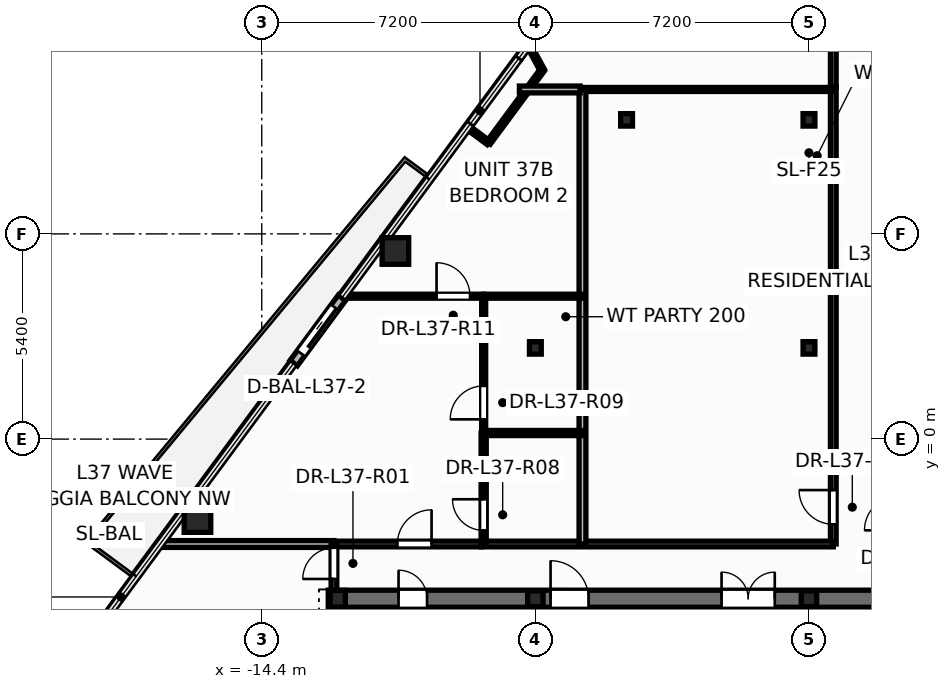
"""IFC4 building model, lengths in metres.
Left out: names, types, materials, properties, quantities, classifications, styles, units other than length and angle.
Written with IfcOpenShell. Run it as: python <this file> out.ifc"""

import sys

from ifc_helpers import new_model, si_unit, direction, frame, frame_2d, origin, origin_2d, place, context, subcontext, project, spatial, rectangle, hollow_circle, i_section, extrude, element, fill, save


model = new_model("IFC4")
c1 = context("Model", 3, precision=1e-05, world=origin(), true_north=direction((0.0, 1.0)))
c2 = subcontext(c1, "Body", "Model", "MODEL_VIEW")
j1 = project(units=[si_unit("LENGTHUNIT", "METRE"), si_unit("PLANEANGLEUNIT", "RADIAN")], contexts=[c1])
p1 = place(None, origin())
s1 = spatial("IfcSite", under=j1, at=p1, CompositionType="ELEMENT")
p2 = place(p1, origin())
s2 = spatial("IfcBuilding", under=s1, at=p2, CompositionType="ELEMENT")
p3 = place(p2, frame((0.0, 0.0, 143.7)))
s3 = spatial("IfcBuildingStorey", under=s2, at=p3, CompositionType="ELEMENT", Elevation=143.7)
for number, where, z_axis, x_axis in (
    (1, (-10.883, 4.95, 0.0), (0.0, 0.0, 1.0), (1.0, 0.0, 0.0)),
    (2, (-16.092, -2.103, 0.0), (0.0, 0.0, 1.0), (1.0, 0.0, 0.0)),
):
    element("IfcColumn", number, at=place(p3, frame(where, z_axis=z_axis, x_axis=x_axis)), inside=s3, PredefinedType="COLUMN", context=c2, shape_type="SweptSolid", body=[
        extrude(hollow_circle(Radius=0.35, WallThickness=0.03, at=origin_2d()), origin(), (0.0, 0.0, 1.0), 3.6),
    ])
p4 = place(p3, frame((-12.4, -4.2, 0.0), z_axis=(0.0, 0.0, 1.0), x_axis=(1.0, 0.0, 0.0)))
e3 = element("IfcColumn", 3, at=p4, inside=s3, PredefinedType="COLUMN", context=c2, shape_type="SweptSolid", body=[
    extrude(i_section(OverallWidth=0.4, OverallDepth=0.44, WebThickness=0.028, FlangeThickness=0.04, at=origin_2d()), origin(), (0.0, 0.0, 1.0), 3.6),
])
for number, where, z_axis, x_axis in (
    (4, (-7.2, -4.2, 0.0), (0.0, 0.0, 1.0), (1.0, 0.0, 0.0)),
    (5, (0.0, -4.2, 0.0), (0.0, 0.0, 1.0), (1.0, 0.0, 0.0)),
):
    element("IfcColumn", number, at=place(p3, frame(where, z_axis=z_axis, x_axis=x_axis)), inside=s3, PredefinedType="PILASTER", context=c2, shape_type="SweptSolid", body=[
        extrude(i_section(OverallWidth=0.405, OverallDepth=0.414, WebThickness=0.022, FlangeThickness=0.032, at=origin_2d()), origin(), (0.0, 0.0, 1.0), 3.6),
    ])
for number, where, z_axis, x_axis in (
    (6, (-7.2, 2.4, 0.0), (0.0, 0.0, 1.0), (1.0, 0.0, 0.0)),
    (7, (0.0, 2.4, 0.0), (0.0, 0.0, 1.0), (1.0, 0.0, 0.0)),
    (8, (-4.8, 8.4, 0.0), (0.0, 0.0, 1.0), (1.0, 0.0, 0.0)),
    (9, (0.0, 8.4, 0.0), (0.0, 0.0, 1.0), (1.0, 0.0, 0.0)),
):
    element("IfcColumn", number, at=place(p3, frame(where, z_axis=z_axis, x_axis=x_axis)), inside=s3, PredefinedType="COLUMN", context=c2, shape_type="SweptSolid", body=[
        extrude(i_section(OverallWidth=0.311, OverallDepth=0.327, WebThickness=0.016, FlangeThickness=0.025, at=origin_2d()), origin(), (0.0, 0.0, 1.0), 3.6),
    ])
p5 = place(p3, frame((-12.288, 3.721, -0.015), z_axis=(0.0, 0.0, 1.0), x_axis=(-0.593996463284, -0.804467651062, 0.0)))
e10 = element("IfcWall", 10, at=p5, inside=s3, PredefinedType="STANDARD", context=c2, shape_type="SweptSolid", body=[
    extrude(rectangle(XDim=2.14, YDim=0.24, at=frame_2d((1.07, 0.0))), origin(), (0.0, 0.0, 1.0), 2.807),
])
p6 = place(p5, frame((0.32, 0.0, 0.015)))
e11 = element("IfcOpeningElement", 11, at=p6, cuts=e10, PredefinedType="OPENING", context=c2, shape_type="SweptSolid", body=[
    extrude(rectangle(XDim=1.506, YDim=2.204, at=frame_2d((0.75, 1.102))), frame((0.0, 0.13, 0.0), z_axis=(0.0, -1.0, 0.0), x_axis=(1.0, 0.0, 0.0)), (0.0, 0.0, 1.0), 0.26),
])
p7 = place(p3, frame((-2.88, -5.6, 0.0), z_axis=(0.0, 0.0, 1.0), x_axis=(0.0, 1.0, 0.0)))
e12 = element("IfcWall", 12, at=p7, inside=s3, PredefinedType="PARTITIONING", context=c2, shape_type="SweptSolid", body=[
    extrude(rectangle(XDim=1.15, YDim=0.15, at=frame_2d((0.575, 0.0))), origin(), (0.0, 0.0, 1.0), 3.35),
])
p8 = place(p3, frame((-12.65, -4.2, 0.0), z_axis=(0.0, 0.0, 1.0), x_axis=(1.0, 0.0, 0.0)))
e13 = element("IfcWall", 13, at=p8, inside=s3, PredefinedType="SHEAR", context=c2, shape_type="SweptSolid", body=[
    extrude(rectangle(XDim=25.3, YDim=0.45, at=frame_2d((12.65, 0.0))), origin(), (0.0, 0.0, 1.0), 3.6),
])
p9 = place(p8, frame((1.85, 0.0, 0.0)))
e14 = element("IfcOpeningElement", 14, at=p9, cuts=e13, PredefinedType="OPENING", context=c2, shape_type="SweptSolid", body=[
    extrude(rectangle(XDim=0.756, YDim=2.054, at=frame_2d((0.375, 1.027))), frame((0.0, 0.235, 0.0), z_axis=(0.0, -1.0, 0.0), x_axis=(1.0, 0.0, 0.0)), (0.0, 0.0, 1.0), 0.47),
])
p10 = place(p8, frame((21.85, 0.0, 0.0)))
e15 = element("IfcOpeningElement", 15, at=p10, cuts=e13, PredefinedType="OPENING", context=c2, shape_type="SweptSolid", body=[
    extrude(rectangle(XDim=0.756, YDim=2.054, at=frame_2d((0.375, 1.027))), frame((0.0, 0.235, 0.0), z_axis=(0.0, -1.0, 0.0), x_axis=(1.0, 0.0, 0.0)), (0.0, 0.0, 1.0), 0.47),
])
p11 = place(p8, frame((23.5, 0.0, 0.0)))
e16 = element("IfcOpeningElement", 16, at=p11, cuts=e13, PredefinedType="OPENING", context=c2, shape_type="SweptSolid", body=[
    extrude(rectangle(XDim=0.756, YDim=2.054, at=frame_2d((0.375, 1.027))), frame((0.0, 0.235, 0.0), z_axis=(0.0, -1.0, 0.0), x_axis=(1.0, 0.0, 0.0)), (0.0, 0.0, 1.0), 0.47),
])
p12 = place(p8, frame((5.85, 0.0, 0.0)))
e17 = element("IfcOpeningElement", 17, at=p12, cuts=e13, PredefinedType="OPENING", context=c2, shape_type="SweptSolid", body=[
    extrude(rectangle(XDim=1.006, YDim=2.104, at=frame_2d((0.5, 1.052))), frame((0.0, 0.235, 0.0), z_axis=(0.0, -1.0, 0.0), x_axis=(1.0, 0.0, 0.0)), (0.0, 0.0, 1.0), 0.47),
])
p13 = place(p8, frame((10.35, 0.0, 0.0)))
e18 = element("IfcOpeningElement", 18, at=p13, cuts=e13, PredefinedType="OPENING", context=c2, shape_type="SweptSolid", body=[
    extrude(rectangle(XDim=1.406, YDim=2.154, at=frame_2d((0.7, 1.077))), frame((0.0, 0.235, 0.0), z_axis=(0.0, -1.0, 0.0), x_axis=(1.0, 0.0, 0.0)), (0.0, 0.0, 1.0), 0.47),
])
p14 = place(p8, frame((18.45, 0.0, 0.0)))
e19 = element("IfcOpeningElement", 19, at=p14, cuts=e13, PredefinedType="OPENING", context=c2, shape_type="SweptSolid", body=[
    extrude(rectangle(XDim=1.006, YDim=2.104, at=frame_2d((0.5, 1.052))), frame((0.0, 0.235, 0.0), z_axis=(0.0, -1.0, 0.0), x_axis=(1.0, 0.0, 0.0)), (0.0, 0.0, 1.0), 0.47),
])
p15 = place(p3, frame((-8.48, -13.85, 0.0), z_axis=(0.0, 0.0, 1.0), x_axis=(0.0, 1.0, 0.0)))
e20 = element("IfcWall", 20, at=p15, inside=s3, PredefinedType="SHEAR", context=c2, shape_type="SweptSolid", body=[
    extrude(rectangle(XDim=9.4, YDim=0.25, at=frame_2d((4.7, 0.0))), origin(), (0.0, 0.0, 1.0), 3.6),
])
p16 = place(p15, frame((6.95, 0.0, 0.0)))
e21 = element("IfcOpeningElement", 21, at=p16, cuts=e20, PredefinedType="OPENING", context=c2, shape_type="SweptSolid", body=[
    extrude(rectangle(XDim=1.006, YDim=2.104, at=frame_2d((0.5, 1.052))), frame((0.0, 0.135, 0.0), z_axis=(0.0, -1.0, 0.0), x_axis=(1.0, 0.0, 0.0)), (0.0, 0.0, 1.0), 0.27),
])
p17 = place(p3, frame((-5.12, -13.85, 0.0), z_axis=(0.0, 0.0, 1.0), x_axis=(0.0, 1.0, 0.0)))
e22 = element("IfcWall", 22, at=p17, inside=s3, PredefinedType="SHEAR", context=c2, shape_type="SweptSolid", body=[
    extrude(rectangle(XDim=9.4, YDim=0.25, at=frame_2d((4.7, 0.0))), origin(), (0.0, 0.0, 1.0), 3.6),
])
p18 = place(p3, frame((-12.4, -13.85, 0.0), z_axis=(0.0, 0.0, 1.0), x_axis=(0.0, 1.0, 0.0)))
e23 = element("IfcWall", 23, at=p18, inside=s3, PredefinedType="SHEAR", context=c2, shape_type="SweptSolid", body=[
    extrude(rectangle(XDim=9.4, YDim=0.45, at=frame_2d((4.7, 0.0))), origin(), (0.0, 0.0, 1.0), 3.6),
])
p19 = place(p3, frame((0.64, -2.76, 0.0), z_axis=(0.0, 0.0, 1.0), x_axis=(0.0, 1.0, 0.0)))
e24 = element("IfcWall", 24, at=p19, inside=s3, PredefinedType="PARTITIONING", context=c2, shape_type="SweptSolid", body=[
    extrude(rectangle(XDim=12.02, YDim=0.15, at=frame_2d((6.01, 0.0))), origin(), (0.0, 0.0, 1.0), 2.325),
])
p20 = place(p19, frame((0.519, 0.0, 0.0)))
e25 = element("IfcOpeningElement", 25, at=p20, cuts=e24, PredefinedType="OPENING", context=c2, shape_type="SweptSolid", body=[
    extrude(rectangle(XDim=0.906, YDim=2.104, at=frame_2d((0.45, 1.052))), frame((0.0, 0.085, 0.0), z_axis=(0.0, -1.0, 0.0), x_axis=(1.0, 0.0, 0.0)), (0.0, 0.0, 1.0), 0.17),
])
p21 = place(p3, frame((-8.62, -2.76, 0.0), z_axis=(0.0, 0.0, 1.0), x_axis=(1.0, 0.0, 0.0)))
e26 = element("IfcWall", 26, at=p21, inside=s3, PredefinedType="PARTITIONING", context=c2, shape_type="SweptSolid", body=[
    extrude(rectangle(XDim=9.26, YDim=0.15, at=frame_2d((4.63, 0.0))), origin(), (0.0, 0.0, 1.0), 2.325),
])
p22 = place(p3, frame((-6.02, 9.2, 0.0), z_axis=(0.0, 0.0, 1.0), x_axis=(1.0, 0.0, 0.0)))
e27 = element("IfcWall", 27, at=p22, inside=s3, PredefinedType="PARTITIONING", context=c2, shape_type="SweptSolid", body=[
    extrude(rectangle(XDim=6.66, YDim=0.105, at=frame_2d((3.33, 0.0))), origin(), (0.0, 0.0, 1.0), 2.617),
])
p23 = place(p3, frame((-5.96, -2.76, 0.0), z_axis=(0.0, 0.0, 1.0), x_axis=(0.0, 1.0, 0.0)))
e28 = element("IfcWall", 28, at=p23, inside=s3, PredefinedType="PARTITIONING", context=c2, shape_type="SweptSolid", body=[
    extrude(rectangle(XDim=11.96, YDim=0.18, at=frame_2d((5.98, 0.0))), origin(), (0.0, 0.0, 1.0), 2.325),
])
p24 = place(p3, frame((-17.074, -2.76, 0.0), z_axis=(0.0, 0.0, 1.0), x_axis=(1.0, 0.0, 0.0)))
e29 = element("IfcWall", 29, at=p24, inside=s3, PredefinedType="PARTITIONING", context=c2, shape_type="SweptSolid", body=[
    extrude(rectangle(XDim=4.574, YDim=0.18, at=frame_2d((2.287, 0.0))), origin(), (0.0, 0.0, 1.0), 2.792),
])
p25 = place(p3, frame((-12.5, -2.76, 0.0), z_axis=(0.0, 0.0, 1.0), x_axis=(1.0, 0.0, 0.0)))
e30 = element("IfcWall", 30, at=p25, inside=s3, PredefinedType="PARTITIONING", context=c2, shape_type="SweptSolid", body=[
    extrude(rectangle(XDim=3.878, YDim=0.15, at=frame_2d((1.939, 0.0))), origin(), (0.0, 0.0, 1.0), 3.35),
])
p26 = place(p25, frame((1.669, 0.0, 0.0)))
e31 = element("IfcOpeningElement", 31, at=p26, cuts=e30, PredefinedType="OPENING", context=c2, shape_type="SweptSolid", body=[
    extrude(rectangle(XDim=0.906, YDim=2.104, at=frame_2d((0.45, 1.052))), frame((0.0, 0.085, 0.0), z_axis=(0.0, -1.0, 0.0), x_axis=(1.0, 0.0, 0.0)), (0.0, 0.0, 1.0), 0.17),
])
p27 = place(p3, frame((-12.259, 3.76, 0.0), z_axis=(0.0, 0.0, 1.0), x_axis=(1.0, 0.0, 0.0)))
e32 = element("IfcWall", 32, at=p27, inside=s3, PredefinedType="PARTITIONING", context=c2, shape_type="SweptSolid", body=[
    extrude(rectangle(XDim=3.699, YDim=0.105, at=frame_2d((1.849, 0.0))), origin(), (0.0, 0.0, 1.0), 2.792),
])
p28 = place(p27, frame((2.459, 0.0, 0.0)))
e33 = element("IfcOpeningElement", 33, at=p28, cuts=e32, PredefinedType="OPENING", context=c2, shape_type="SweptSolid", body=[
    extrude(rectangle(XDim=0.886, YDim=2.104, at=frame_2d((0.44, 1.052))), frame((0.0, 0.062, 0.0), z_axis=(0.0, -1.0, 0.0), x_axis=(1.0, 0.0, 0.0)), (0.0, 0.0, 1.0), 0.125),
])
p29 = place(p3, frame((-8.56, 0.16, 0.0), z_axis=(0.0, 0.0, 1.0), x_axis=(0.0, 1.0, 0.0)))
e34 = element("IfcWall", 34, at=p29, inside=s3, PredefinedType="PARTITIONING", context=c2, shape_type="SweptSolid", body=[
    extrude(rectangle(XDim=3.6, YDim=0.105, at=frame_2d((1.8, 0.0))), origin(), (0.0, 0.0, 1.0), 2.617),
])
p30 = place(p29, frame((0.36, 0.0, 0.0)))
e35 = element("IfcOpeningElement", 35, at=p30, cuts=e34, PredefinedType="OPENING", context=c2, shape_type="SweptSolid", body=[
    extrude(rectangle(XDim=0.886, YDim=2.104, at=frame_2d((0.44, 1.052))), frame((0.0, 0.062, 0.0), z_axis=(0.0, -1.0, 0.0), x_axis=(1.0, 0.0, 0.0)), (0.0, 0.0, 1.0), 0.125),
])
p31 = place(p3, frame((-8.56, -2.76, 0.0), z_axis=(0.0, 0.0, 1.0), x_axis=(0.0, 1.0, 0.0)))
e36 = element("IfcWall", 36, at=p31, inside=s3, PredefinedType="PARTITIONING", context=c2, shape_type="SweptSolid", body=[
    extrude(rectangle(XDim=2.92, YDim=0.135, at=frame_2d((1.46, 0.0))), origin(), (0.0, 0.0, 1.0), 3.35),
])
p32 = place(p31, frame((0.357, 0.0, 0.0)))
e37 = element("IfcOpeningElement", 37, at=p32, cuts=e36, PredefinedType="OPENING", context=c2, shape_type="SweptSolid", body=[
    extrude(rectangle(XDim=0.826, YDim=2.104, at=frame_2d((0.41, 1.052))), frame((0.0, 0.078, 0.0), z_axis=(0.0, -1.0, 0.0), x_axis=(1.0, 0.0, 0.0)), (0.0, 0.0, 1.0), 0.155),
])
p33 = place(p3, frame((0.64, 9.262, 0.0), z_axis=(0.0, 0.0, 1.0), x_axis=(0.0, 1.0, 0.0)))
e38 = element("IfcWall", 38, at=p33, inside=s3, PredefinedType="PARTITIONING", context=c2, shape_type="SweptSolid", body=[
    extrude(rectangle(XDim=2.538, YDim=0.15, at=frame_2d((1.269, 0.0))), origin(), (0.0, 0.0, 1.0), 3.35),
])
p34 = place(p33, frame((1.05, 0.0, 0.0)))
e39 = element("IfcOpeningElement", 39, at=p34, cuts=e38, PredefinedType="OPENING", context=c2, shape_type="SweptSolid", body=[
    extrude(rectangle(XDim=0.906, YDim=2.104, at=frame_2d((0.45, 1.052))), frame((0.0, 0.085, 0.0), z_axis=(0.0, -1.0, 0.0), x_axis=(1.0, 0.0, 0.0)), (0.0, 0.0, 1.0), 0.17),
])
p35 = place(p3, frame((-8.56, 0.16, 0.0), z_axis=(0.0, 0.0, 1.0), x_axis=(1.0, 0.0, 0.0)))
e40 = element("IfcWall", 40, at=p35, inside=s3, PredefinedType="PARTITIONING", context=c2, shape_type="SweptSolid", body=[
    extrude(rectangle(XDim=2.6, YDim=0.135, at=frame_2d((1.3, 0.0))), origin(), (0.0, 0.0, 1.0), 2.325),
])
p36 = place(p3, frame((-8.56, 3.76, 0.0), z_axis=(0.0, 0.0, 1.0), x_axis=(1.0, 0.0, 0.0)))
e41 = element("IfcWall", 41, at=p36, inside=s3, PredefinedType="PARTITIONING", context=c2, shape_type="SweptSolid", body=[
    extrude(rectangle(XDim=2.6, YDim=0.105, at=frame_2d((1.3, 0.0))), origin(), (0.0, 0.0, 1.0), 2.617),
])
p37 = place(p3, frame((-7.019, 9.71, 0.0), z_axis=(0.0, 0.0, 1.0), x_axis=(-0.594168747529, -0.804340412674, 0.0)))
e42 = element("IfcWall", 42, at=p37, inside=s3, PredefinedType="PARTITIONING", context=c2, shape_type="SweptSolid", body=[
    extrude(rectangle(XDim=2.378, YDim=0.12, at=frame_2d((1.189, 0.0))), origin(), (0.0, 0.0, 1.0), 3.35),
])
p38 = place(p3, frame((-7.62, 9.2, 0.0), z_axis=(0.0, 0.0, 1.0), x_axis=(1.0, 0.0, 0.0)))
e43 = element("IfcWall", 43, at=p38, inside=s3, PredefinedType="PARTITIONING", context=c2, shape_type="SweptSolid", body=[
    extrude(rectangle(XDim=1.598, YDim=0.18, at=frame_2d((0.799, 0.0))), origin(), (0.0, 0.0, 1.0), 3.35),
])
p39 = place(p3, frame((-12.5, -4.24, 0.0), z_axis=(0.0, 0.0, 1.0), x_axis=(0.0, 1.0, 0.0)))
e44 = element("IfcWall", 44, at=p39, inside=s3, PredefinedType="PARTITIONING", context=c2, shape_type="SweptSolid", body=[
    extrude(rectangle(XDim=1.48, YDim=0.15, at=frame_2d((0.74, 0.0))), origin(), (0.0, 0.0, 1.0), 2.325),
])
p40 = place(p39, frame((0.56, 0.0, 0.0)))
e45 = element("IfcOpeningElement", 45, at=p40, cuts=e44, PredefinedType="OPENING", context=c2, shape_type="SweptSolid", body=[
    extrude(rectangle(XDim=0.826, YDim=2.104, at=frame_2d((0.41, 1.052))), frame((0.0, 0.085, 0.0), z_axis=(0.0, -1.0, 0.0), x_axis=(1.0, 0.0, 0.0)), (0.0, 0.0, 1.0), 0.17),
])
p41 = place(p3, frame((-7.372, 10.361, 0.0), z_axis=(0.0, 0.0, 1.0), x_axis=(0.476400054493, -0.879228632427, 0.0)))
e46 = element("IfcWall", 46, at=p41, inside=s3, PredefinedType="PARTITIONING", context=c2, shape_type="SweptSolid", body=[
    extrude(rectangle(XDim=0.74, YDim=0.12, at=frame_2d((0.37, 0.0))), origin(), (0.0, 0.0, 1.0), 2.792),
])
p42 = place(p3, frame((-8.432, 7.798, 0.0), z_axis=(0.0, 0.0, 1.0), x_axis=(-0.804395751644, 0.594093826543, 0.0)))
e47 = element("IfcWall", 47, at=p42, inside=s3, PredefinedType="PARTITIONING", context=c2, shape_type="SweptSolid", body=[
    extrude(rectangle(XDim=0.67, YDim=0.12, at=frame_2d((0.335, 0.0))), origin(), (0.0, 0.0, 1.0), 2.792),
])
p43 = place(p6, origin())
e48 = element("IfcDoor", 48, at=p43, inside=s3, OperationType="SLIDING_TO_RIGHT", PredefinedType="DOOR", context=c2, shape_type="SweptSolid", body=[
    extrude(rectangle(XDim=1.5, YDim=2.2, at=frame_2d((0.75, 1.1))), frame((0.0, 0.025, 0.0), z_axis=(0.0, -1.0, 0.0), x_axis=(1.0, 0.0, 0.0)), (0.0, 0.0, 1.0), 0.05),
])
fill(e11, e48)
p44 = place(p9, origin())
e49 = element("IfcDoor", 49, at=p44, inside=s3, OperationType="SINGLE_SWING_LEFT", PredefinedType="DOOR", context=c2, shape_type="SweptSolid", body=[
    extrude(rectangle(XDim=0.75, YDim=2.05, at=frame_2d((0.375, 1.025))), frame((0.0, 0.025, 0.0), z_axis=(0.0, -1.0, 0.0), x_axis=(1.0, 0.0, 0.0)), (0.0, 0.0, 1.0), 0.05),
])
fill(e14, e49)
p45 = place(p12, origin())
e50 = element("IfcDoor", 50, at=p45, inside=s3, OperationType="SINGLE_SWING_LEFT", PredefinedType="DOOR", context=c2, shape_type="SweptSolid", body=[
    extrude(rectangle(XDim=1.0, YDim=2.1, at=frame_2d((0.5, 1.05))), frame((0.0, 0.025, 0.0), z_axis=(0.0, -1.0, 0.0), x_axis=(1.0, 0.0, 0.0)), (0.0, 0.0, 1.0), 0.05),
])
fill(e17, e50)
p46 = place(p13, origin())
e51 = element("IfcDoor", 51, at=p46, inside=s3, OperationType="DOUBLE_DOOR_SINGLE_SWING", PredefinedType="DOOR", context=c2, shape_type="SweptSolid", body=[
    extrude(rectangle(XDim=1.4, YDim=2.15, at=frame_2d((0.7, 1.075))), frame((0.0, 0.025, 0.0), z_axis=(0.0, -1.0, 0.0), x_axis=(1.0, 0.0, 0.0)), (0.0, 0.0, 1.0), 0.05),
])
fill(e18, e51)
p47 = place(p40, origin())
e52 = element("IfcDoor", 52, at=p47, inside=s3, OperationType="SINGLE_SWING_LEFT", PredefinedType="DOOR", context=c2, shape_type="SweptSolid", body=[
    extrude(rectangle(XDim=0.82, YDim=2.1, at=frame_2d((0.41, 1.05))), frame((0.0, 0.025, 0.0), z_axis=(0.0, -1.0, 0.0), x_axis=(1.0, 0.0, 0.0)), (0.0, 0.0, 1.0), 0.05),
])
fill(e45, e52)
p48 = place(p32, origin())
e53 = element("IfcDoor", 53, at=p48, inside=s3, OperationType="SINGLE_SWING_RIGHT", PredefinedType="DOOR", context=c2, shape_type="SweptSolid", body=[
    extrude(rectangle(XDim=0.82, YDim=2.1, at=frame_2d((0.41, 1.05))), frame((0.0, 0.025, 0.0), z_axis=(0.0, -1.0, 0.0), x_axis=(1.0, 0.0, 0.0)), (0.0, 0.0, 1.0), 0.05),
])
fill(e37, e53)
p49 = place(p30, origin())
e54 = element("IfcDoor", 54, at=p49, inside=s3, OperationType="SINGLE_SWING_LEFT", PredefinedType="DOOR", context=c2, shape_type="SweptSolid", body=[
    extrude(rectangle(XDim=0.88, YDim=2.1, at=frame_2d((0.44, 1.05))), frame((0.0, 0.025, 0.0), z_axis=(0.0, -1.0, 0.0), x_axis=(1.0, 0.0, 0.0)), (0.0, 0.0, 1.0), 0.05),
])
fill(e35, e54)
p50 = place(p26, origin())
e55 = element("IfcDoor", 55, at=p50, inside=s3, OperationType="SINGLE_SWING_RIGHT", PredefinedType="DOOR", context=c2, shape_type="SweptSolid", body=[
    extrude(rectangle(XDim=0.9, YDim=2.1, at=frame_2d((0.45, 1.05))), frame((0.0, 0.025, 0.0), z_axis=(0.0, -1.0, 0.0), x_axis=(1.0, 0.0, 0.0)), (0.0, 0.0, 1.0), 0.05),
])
fill(e31, e55)
p51 = place(p28, origin())
e56 = element("IfcDoor", 56, at=p51, inside=s3, OperationType="SINGLE_SWING_LEFT", PredefinedType="DOOR", context=c2, shape_type="SweptSolid", body=[
    extrude(rectangle(XDim=0.88, YDim=2.1, at=frame_2d((0.44, 1.05))), frame((0.0, 0.025, 0.0), z_axis=(0.0, -1.0, 0.0), x_axis=(1.0, 0.0, 0.0)), (0.0, 0.0, 1.0), 0.05),
])
fill(e33, e56)
p52 = place(p20, origin())
e57 = element("IfcDoor", 57, at=p52, inside=s3, OperationType="SINGLE_SWING_RIGHT", PredefinedType="DOOR", context=c2, shape_type="SweptSolid", body=[
    extrude(rectangle(XDim=0.9, YDim=2.1, at=frame_2d((0.45, 1.05))), frame((0.0, 0.025, 0.0), z_axis=(0.0, -1.0, 0.0), x_axis=(1.0, 0.0, 0.0)), (0.0, 0.0, 1.0), 0.05),
])
fill(e25, e57)
save(model, sys.argv[1])
